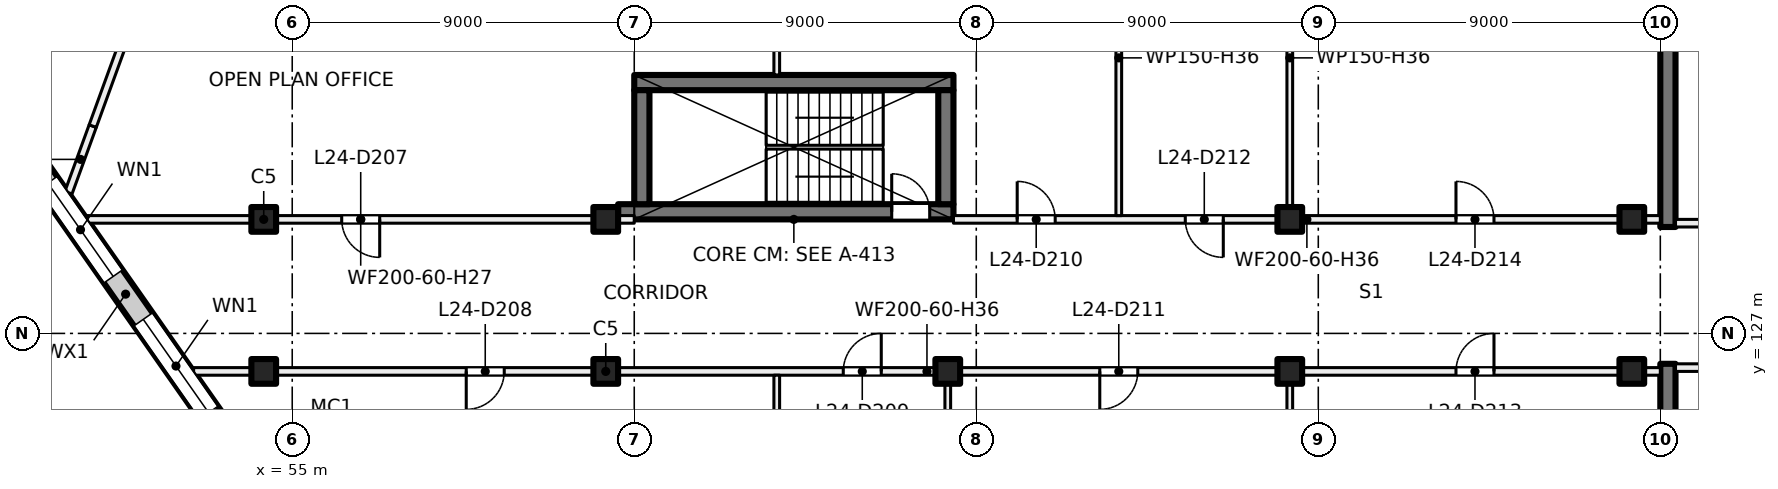
"""IFC4 building model, lengths in metres.
Left out: names, types, materials, properties, quantities, classifications, styles, units other than length and angle.
Written with IfcOpenShell. Run it as: python <this file> out.ifc"""

import sys

from ifc_helpers import new_model, si_unit, direction, frame, frame_2d, origin, origin_2d, place, context, subcontext, project, spatial, rectangle, extrude, element, fill, save


model = new_model("IFC4")
c1 = context("Model", 3, precision=1e-05, world=origin(), true_north=direction((0.0, 1.0)))
c2 = subcontext(c1, "Body", "Model", "MODEL_VIEW")
j1 = project(units=[si_unit("LENGTHUNIT", "METRE"), si_unit("PLANEANGLEUNIT", "RADIAN")], contexts=[c1])
p1 = place(None, origin())
s1 = spatial("IfcSite", under=j1, at=p1, CompositionType="ELEMENT")
p2 = place(p1, origin())
s2 = spatial("IfcBuilding", under=s1, at=p2, CompositionType="ELEMENT")
p3 = place(p2, frame((0.0, 0.0, 105.0)))
s3 = spatial("IfcBuildingStorey", under=s2, at=p3, CompositionType="ELEMENT", Elevation=105.0)
for number, where, z_axis, x_axis in (
    (1, (54.25, 130.0, 0.0), (0.0, 0.0, 1.0), (1.0, 0.0, 0.0)),
    (2, (63.25, 130.0, 0.0), (0.0, 0.0, 1.0), (1.0, 0.0, 0.0)),
    (3, (81.25, 130.0, 0.0), (0.0, 0.0, 1.0), (1.0, 0.0, 0.0)),
    (4, (90.25, 130.0, 0.0), (0.0, 0.0, 1.0), (1.0, 0.0, 0.0)),
    (5, (54.25, 126.0, 0.0), (0.0, 0.0, 1.0), (1.0, 0.0, 0.0)),
    (6, (63.25, 126.0, 0.0), (0.0, 0.0, 1.0), (1.0, 0.0, 0.0)),
    (7, (72.25, 126.0, 0.0), (0.0, 0.0, 1.0), (1.0, 0.0, 0.0)),
    (8, (81.25, 126.0, 0.0), (0.0, 0.0, 1.0), (1.0, 0.0, 0.0)),
    (9, (90.25, 126.0, 0.0), (0.0, 0.0, 1.0), (1.0, 0.0, 0.0)),
):
    element("IfcColumn", number, at=place(p3, frame(where, z_axis=z_axis, x_axis=x_axis)), inside=s3, PredefinedType="COLUMN", context=c2, shape_type="SweptSolid", body=[
        extrude(rectangle(XDim=0.65, YDim=0.65, at=origin_2d()), origin(), (0.0, 0.0, 1.0), 4.0),
    ])
for number, where, z_axis, x_axis in (
    (10, (91.2, 138.4, 0.0), (0.0, 0.0, 1.0), (0.0, -1.0, 0.0)),
    (11, (91.2, 126.2, 0.0), (0.0, 0.0, 1.0), (0.0, -1.0, 0.0)),
):
    element("IfcWall", number, at=place(p3, frame(where, z_axis=z_axis, x_axis=x_axis)), inside=s3, PredefinedType="SHEAR", context=c2, shape_type="SweptSolid", body=[
        extrude(rectangle(XDim=8.6, YDim=0.4, at=frame_2d((4.3, 0.0))), origin(), (0.0, 0.0, 1.0), 4.0),
    ])
p4 = place(p3, frame((63.575, 130.2, 0.0), z_axis=(0.0, 0.0, 1.0), x_axis=(1.0, 0.0, 0.0)))
e12 = element("IfcWall", 12, at=p4, inside=s3, PredefinedType="SHEAR", context=c2, shape_type="SweptSolid", body=[
    extrude(rectangle(XDim=8.825, YDim=0.4, at=frame_2d((4.413, 0.0))), origin(), (0.0, 0.0, 1.0), 4.0),
])
p5 = place(p4, frame((7.2, 0.0, 0.0)))
e13 = element("IfcOpeningElement", 13, at=p5, cuts=e12, PredefinedType="OPENING", context=c2, shape_type="SweptSolid", body=[
    extrude(rectangle(XDim=1.0, YDim=2.1, at=frame_2d((0.5, 1.05))), frame((0.0, 0.21, 0.0), z_axis=(0.0, -1.0, 0.0), x_axis=(1.0, 0.0, 0.0)), (0.0, 0.0, 1.0), 0.42),
])
p6 = place(p3, frame((64.0, 133.6, 0.0), z_axis=(0.0, 0.0, 1.0), x_axis=(1.0, 0.0, 0.0)))
e14 = element("IfcWall", 14, at=p6, inside=s3, PredefinedType="SHEAR", context=c2, shape_type="SweptSolid", body=[
    extrude(rectangle(XDim=8.4, YDim=0.4, at=frame_2d((4.2, 0.0))), origin(), (0.0, 0.0, 1.0), 4.0),
])
for number, where, z_axis, x_axis in (
    (15, (64.2, 130.4, 0.0), (0.0, 0.0, 1.0), (0.0, 1.0, 0.0)),
    (16, (72.2, 130.4, 0.0), (0.0, 0.0, 1.0), (0.0, 1.0, 0.0)),
):
    element("IfcWall", number, at=place(p3, frame(where, z_axis=z_axis, x_axis=x_axis)), inside=s3, PredefinedType="SHEAR", context=c2, shape_type="SweptSolid", body=[
        extrude(rectangle(XDim=3.0, YDim=0.4, at=frame_2d((1.5, 0.0))), origin(), (0.0, 0.0, 1.0), 4.0),
    ])
p7 = place(p3, frame((58.083, 117.369, 0.0), z_axis=(0.0, 0.0, 1.0), x_axis=(-0.573573095716, 0.819154383416, 0.0)))
e17 = element("IfcWall", 17, at=p7, inside=s3, PredefinedType="SOLIDWALL", context=c2, shape_type="SweptSolid", body=[
    extrude(rectangle(XDim=26.037, YDim=0.6, at=frame_2d((13.019, 0.0))), origin(), (0.0, 0.0, 1.0), 3.625),
])
p8 = place(p7, frame((1.05, 0.0, 0.0)))
e18 = element("IfcOpeningElement", 18, at=p8, cuts=e17, PredefinedType="OPENING", context=c2, shape_type="SweptSolid", body=[
    extrude(rectangle(XDim=1.8, YDim=2.4, at=frame_2d((0.9, 1.2))), frame((0.0, 0.31, 0.0), z_axis=(0.0, -1.0, 0.0), x_axis=(1.0, 0.0, 0.0)), (0.0, 0.0, 1.0), 0.62),
])
p9 = place(p7, frame((4.829, 0.0, 0.9)))
e19 = element("IfcOpeningElement", 19, at=p9, cuts=e17, PredefinedType="OPENING", context=c2, shape_type="SweptSolid", body=[
    extrude(rectangle(XDim=3.0, YDim=2.4, at=frame_2d((1.5, 1.2))), frame((0.0, 0.31, 0.0), z_axis=(0.0, -1.0, 0.0), x_axis=(1.0, 0.0, 0.0)), (0.0, 0.0, 1.0), 0.62),
])
p10 = place(p7, frame((9.209, 0.0, 0.9)))
e20 = element("IfcOpeningElement", 20, at=p10, cuts=e17, PredefinedType="OPENING", context=c2, shape_type="SweptSolid", body=[
    extrude(rectangle(XDim=3.0, YDim=2.4, at=frame_2d((1.5, 1.2))), frame((0.0, 0.31, 0.0), z_axis=(0.0, -1.0, 0.0), x_axis=(1.0, 0.0, 0.0)), (0.0, 0.0, 1.0), 0.62),
])
p11 = place(p7, frame((13.588, 0.0, 0.9)))
e21 = element("IfcOpeningElement", 21, at=p11, cuts=e17, PredefinedType="OPENING", context=c2, shape_type="SweptSolid", body=[
    extrude(rectangle(XDim=3.0, YDim=2.4, at=frame_2d((1.5, 1.2))), frame((0.0, 0.31, 0.0), z_axis=(0.0, -1.0, 0.0), x_axis=(1.0, 0.0, 0.0)), (0.0, 0.0, 1.0), 0.62),
])
p12 = place(p7, frame((17.968, 0.0, 0.9)))
e22 = element("IfcOpeningElement", 22, at=p12, cuts=e17, PredefinedType="OPENING", context=c2, shape_type="SweptSolid", body=[
    extrude(rectangle(XDim=3.0, YDim=2.4, at=frame_2d((1.5, 1.2))), frame((0.0, 0.31, 0.0), z_axis=(0.0, -1.0, 0.0), x_axis=(1.0, 0.0, 0.0)), (0.0, 0.0, 1.0), 0.62),
])
p13 = place(p7, frame((22.198, 0.0, 0.9)))
e23 = element("IfcOpeningElement", 23, at=p13, cuts=e17, PredefinedType="OPENING", context=c2, shape_type="SweptSolid", body=[
    extrude(rectangle(XDim=3.0, YDim=2.4, at=frame_2d((1.5, 1.2))), frame((0.0, 0.31, 0.0), z_axis=(0.0, -1.0, 0.0), x_axis=(1.0, 0.0, 0.0)), (0.0, 0.0, 1.0), 0.62),
])
p14 = place(p3, frame((36.923, 134.338, 0.0), z_axis=(0.0, 0.0, 1.0), x_axis=(0.573575266068, -0.819152863729, 0.0)))
e24 = element("IfcWall", 24, at=p14, inside=s3, PredefinedType="SOLIDWALL", context=c2, shape_type="SweptSolid", body=[
    extrude(rectangle(XDim=26.117, YDim=0.6, at=frame_2d((13.059, 0.0))), origin(), (0.0, 0.0, 1.0), 3.625),
])
p15 = place(p14, frame((0.84, 0.0, 0.9)))
e25 = element("IfcOpeningElement", 25, at=p15, cuts=e24, PredefinedType="OPENING", context=c2, shape_type="SweptSolid", body=[
    extrude(rectangle(XDim=3.0, YDim=2.4, at=frame_2d((1.5, 1.2))), frame((0.0, 0.31, 0.0), z_axis=(0.0, -1.0, 0.0), x_axis=(1.0, 0.0, 0.0)), (0.0, 0.0, 1.0), 0.62),
])
p16 = place(p14, frame((5.669, 0.0, 0.0)))
e26 = element("IfcOpeningElement", 26, at=p16, cuts=e24, PredefinedType="OPENING", context=c2, shape_type="SweptSolid", body=[
    extrude(rectangle(XDim=1.8, YDim=2.4, at=frame_2d((0.9, 1.2))), frame((0.0, 0.31, 0.0), z_axis=(0.0, -1.0, 0.0), x_axis=(1.0, 0.0, 0.0)), (0.0, 0.0, 1.0), 0.62),
])
p17 = place(p14, frame((9.449, 0.0, 0.9)))
e27 = element("IfcOpeningElement", 27, at=p17, cuts=e24, PredefinedType="OPENING", context=c2, shape_type="SweptSolid", body=[
    extrude(rectangle(XDim=3.0, YDim=2.4, at=frame_2d((1.5, 1.2))), frame((0.0, 0.31, 0.0), z_axis=(0.0, -1.0, 0.0), x_axis=(1.0, 0.0, 0.0)), (0.0, 0.0, 1.0), 0.62),
])
p18 = place(p14, frame((13.829, 0.0, 0.9)))
e28 = element("IfcOpeningElement", 28, at=p18, cuts=e24, PredefinedType="OPENING", context=c2, shape_type="SweptSolid", body=[
    extrude(rectangle(XDim=3.0, YDim=2.4, at=frame_2d((1.5, 1.2))), frame((0.0, 0.31, 0.0), z_axis=(0.0, -1.0, 0.0), x_axis=(1.0, 0.0, 0.0)), (0.0, 0.0, 1.0), 0.62),
])
p19 = place(p14, frame((18.208, 0.0, 0.9)))
e29 = element("IfcOpeningElement", 29, at=p19, cuts=e24, PredefinedType="OPENING", context=c2, shape_type="SweptSolid", body=[
    extrude(rectangle(XDim=3.0, YDim=2.4, at=frame_2d((1.5, 1.2))), frame((0.0, 0.31, 0.0), z_axis=(0.0, -1.0, 0.0), x_axis=(1.0, 0.0, 0.0)), (0.0, 0.0, 1.0), 0.62),
])
p20 = place(p14, frame((22.438, 0.0, 0.9)))
e30 = element("IfcOpeningElement", 30, at=p20, cuts=e24, PredefinedType="OPENING", context=c2, shape_type="SweptSolid", body=[
    extrude(rectangle(XDim=3.0, YDim=2.4, at=frame_2d((1.5, 1.2))), frame((0.0, 0.31, 0.0), z_axis=(0.0, -1.0, 0.0), x_axis=(1.0, 0.0, 0.0)), (0.0, 0.0, 1.0), 0.62),
])
p21 = place(p3, frame((95.2, 126.1, 0.0), z_axis=(0.0, 0.0, 1.0), x_axis=(-1.0, 0.0, 0.0)))
e31 = element("IfcWall", 31, at=p21, inside=s3, PredefinedType="PARTITIONING", context=c2, shape_type="SweptSolid", body=[
    extrude(rectangle(XDim=3.8, YDim=0.2, at=frame_2d((1.9, 0.0))), origin(), (0.0, 0.0, 1.0), 3.625),
])
p22 = place(p21, frame((0.3, 0.0, 0.0)))
e32 = element("IfcOpeningElement", 32, at=p22, cuts=e31, PredefinedType="OPENING", context=c2, shape_type="SweptSolid", body=[
    extrude(rectangle(XDim=1.2, YDim=2.1, at=frame_2d((0.6, 1.05))), frame((0.0, 0.11, 0.0), z_axis=(0.0, -1.0, 0.0), x_axis=(1.0, 0.0, 0.0)), (0.0, 0.0, 1.0), 0.22),
])
p23 = place(p3, frame((91.4, 129.9, 0.0), z_axis=(0.0, 0.0, 1.0), x_axis=(1.0, 0.0, 0.0)))
e33 = element("IfcWall", 33, at=p23, inside=s3, PredefinedType="PARTITIONING", context=c2, shape_type="SweptSolid", body=[
    extrude(rectangle(XDim=3.8, YDim=0.2, at=frame_2d((1.9, 0.0))), origin(), (0.0, 0.0, 1.0), 3.625),
])
p24 = place(p23, frame((2.3, 0.0, 0.0)))
e34 = element("IfcOpeningElement", 34, at=p24, cuts=e33, PredefinedType="OPENING", context=c2, shape_type="SweptSolid", body=[
    extrude(rectangle(XDim=1.2, YDim=2.1, at=frame_2d((0.6, 1.05))), frame((0.0, 0.11, 0.0), z_axis=(0.0, -1.0, 0.0), x_axis=(1.0, 0.0, 0.0)), (0.0, 0.0, 1.0), 0.22),
])
p25 = place(p3, frame((49.112, 130.703, 0.0), z_axis=(0.0, 0.0, 1.0), x_axis=(0.342110969058, 0.939659557952, 0.0)))
e35 = element("IfcWall", 35, at=p25, inside=s3, PredefinedType="PARTITIONING", context=c2, shape_type="SweptSolid", body=[
    extrude(rectangle(XDim=1.865, YDim=0.2, at=frame_2d((0.932, 0.0))), origin(), (0.0, 0.0, 1.0), 2.725),
])
p26 = place(p3, frame((49.604, 130.0, 0.0), z_axis=(0.0, 0.0, 1.0), x_axis=(1.0, 0.0, 0.0)))
e36 = element("IfcWall", 36, at=p26, inside=s3, PredefinedType="PARTITIONING", context=c2, shape_type="SweptSolid", body=[
    extrude(rectangle(XDim=14.396, YDim=0.2, at=frame_2d((7.198, 0.0))), origin(), (0.0, 0.0, 1.0), 2.725),
])
p27 = place(p26, frame((6.698, 0.0, 0.0)))
e37 = element("IfcOpeningElement", 37, at=p27, cuts=e36, PredefinedType="OPENING", context=c2, shape_type="SweptSolid", body=[
    extrude(rectangle(XDim=1.0, YDim=2.1, at=frame_2d((0.5, 1.05))), frame((0.0, 0.11, 0.0), z_axis=(0.0, -1.0, 0.0), x_axis=(1.0, 0.0, 0.0)), (0.0, 0.0, 1.0), 0.22),
])
p28 = place(p3, frame((49.75, 132.455, 0.0), z_axis=(0.0, 0.0, 1.0), x_axis=(0.342030876691, 0.939688714091, 0.0)))
e38 = element("IfcWall", 38, at=p28, inside=s3, PredefinedType="PARTITIONING", context=c2, shape_type="SweptSolid", body=[
    extrude(rectangle(XDim=4.631, YDim=0.2, at=frame_2d((2.315, 0.0))), origin(), (0.0, 0.0, 1.0), 2.725),
])
p29 = place(p3, frame((91.0, 126.0, 0.0), z_axis=(0.0, 0.0, 1.0), x_axis=(-1.0, 0.0, 0.0)))
e39 = element("IfcWall", 39, at=p29, inside=s3, PredefinedType="PARTITIONING", context=c2, shape_type="SweptSolid", body=[
    extrude(rectangle(XDim=38.595, YDim=0.2, at=frame_2d((19.297, 0.0))), origin(), (0.0, 0.0, 1.0), 3.625),
])
p30 = place(p29, frame((30.421, 0.0, 0.0)))
e40 = element("IfcOpeningElement", 40, at=p30, cuts=e39, PredefinedType="OPENING", context=c2, shape_type="SweptSolid", body=[
    extrude(rectangle(XDim=1.0, YDim=2.1, at=frame_2d((0.5, 1.05))), frame((0.0, 0.11, 0.0), z_axis=(0.0, -1.0, 0.0), x_axis=(1.0, 0.0, 0.0)), (0.0, 0.0, 1.0), 0.22),
])
p31 = place(p29, frame((20.5, 0.0, 0.0)))
e41 = element("IfcOpeningElement", 41, at=p31, cuts=e39, PredefinedType="OPENING", context=c2, shape_type="SweptSolid", body=[
    extrude(rectangle(XDim=1.0, YDim=2.1, at=frame_2d((0.5, 1.05))), frame((0.0, 0.11, 0.0), z_axis=(0.0, -1.0, 0.0), x_axis=(1.0, 0.0, 0.0)), (0.0, 0.0, 1.0), 0.22),
])
p32 = place(p29, frame((13.75, 0.0, 0.0)))
e42 = element("IfcOpeningElement", 42, at=p32, cuts=e39, PredefinedType="OPENING", context=c2, shape_type="SweptSolid", body=[
    extrude(rectangle(XDim=1.0, YDim=2.1, at=frame_2d((0.5, 1.05))), frame((0.0, 0.11, 0.0), z_axis=(0.0, -1.0, 0.0), x_axis=(1.0, 0.0, 0.0)), (0.0, 0.0, 1.0), 0.22),
])
p33 = place(p29, frame((4.377, 0.0, 0.0)))
e43 = element("IfcOpeningElement", 43, at=p33, cuts=e39, PredefinedType="OPENING", context=c2, shape_type="SweptSolid", body=[
    extrude(rectangle(XDim=1.0, YDim=2.1, at=frame_2d((0.5, 1.05))), frame((0.0, 0.11, 0.0), z_axis=(0.0, -1.0, 0.0), x_axis=(1.0, 0.0, 0.0)), (0.0, 0.0, 1.0), 0.22),
])
p34 = place(p3, frame((67.75, 117.6, 0.0), z_axis=(0.0, 0.0, 1.0), x_axis=(0.0, 1.0, 0.0)))
e44 = element("IfcWall", 44, at=p34, inside=s3, PredefinedType="PARTITIONING", context=c2, shape_type="SweptSolid", body=[
    extrude(rectangle(XDim=8.3, YDim=0.15, at=frame_2d((4.15, 0.0))), origin(), (0.0, 0.0, 1.0), 3.625),
])
p35 = place(p3, frame((67.75, 133.8, 0.0), z_axis=(0.0, 0.0, 1.0), x_axis=(0.0, 1.0, 0.0)))
e45 = element("IfcWall", 45, at=p35, inside=s3, PredefinedType="PARTITIONING", context=c2, shape_type="SweptSolid", body=[
    extrude(rectangle(XDim=4.6, YDim=0.15, at=frame_2d((2.3, 0.0))), origin(), (0.0, 0.0, 1.0), 3.625),
])
p36 = place(p3, frame((72.25, 117.6, 0.0), z_axis=(0.0, 0.0, 1.0), x_axis=(0.0, 1.0, 0.0)))
e46 = element("IfcWall", 46, at=p36, inside=s3, PredefinedType="PARTITIONING", context=c2, shape_type="SweptSolid", body=[
    extrude(rectangle(XDim=8.3, YDim=0.15, at=frame_2d((4.15, 0.0))), origin(), (0.0, 0.0, 1.0), 3.625),
])
p37 = place(p3, frame((72.4, 130.0, 0.0), z_axis=(0.0, 0.0, 1.0), x_axis=(1.0, 0.0, 0.0)))
e47 = element("IfcWall", 47, at=p37, inside=s3, PredefinedType="PARTITIONING", context=c2, shape_type="SweptSolid", body=[
    extrude(rectangle(XDim=18.6, YDim=0.2, at=frame_2d((9.3, 0.0))), origin(), (0.0, 0.0, 1.0), 3.625),
])
p38 = place(p37, frame((1.677, 0.0, 0.0)))
e48 = element("IfcOpeningElement", 48, at=p38, cuts=e47, PredefinedType="OPENING", context=c2, shape_type="SweptSolid", body=[
    extrude(rectangle(XDim=1.0, YDim=2.1, at=frame_2d((0.5, 1.05))), frame((0.0, 0.11, 0.0), z_axis=(0.0, -1.0, 0.0), x_axis=(1.0, 0.0, 0.0)), (0.0, 0.0, 1.0), 0.22),
])
p39 = place(p37, frame((6.1, 0.0, 0.0)))
e49 = element("IfcOpeningElement", 49, at=p39, cuts=e47, PredefinedType="OPENING", context=c2, shape_type="SweptSolid", body=[
    extrude(rectangle(XDim=1.0, YDim=2.1, at=frame_2d((0.5, 1.05))), frame((0.0, 0.11, 0.0), z_axis=(0.0, -1.0, 0.0), x_axis=(1.0, 0.0, 0.0)), (0.0, 0.0, 1.0), 0.22),
])
p40 = place(p37, frame((13.223, 0.0, 0.0)))
e50 = element("IfcOpeningElement", 50, at=p40, cuts=e47, PredefinedType="OPENING", context=c2, shape_type="SweptSolid", body=[
    extrude(rectangle(XDim=1.0, YDim=2.1, at=frame_2d((0.5, 1.05))), frame((0.0, 0.11, 0.0), z_axis=(0.0, -1.0, 0.0), x_axis=(1.0, 0.0, 0.0)), (0.0, 0.0, 1.0), 0.22),
])
for number, where, z_axis, x_axis in (
    (51, (76.75, 130.1, 0.0), (0.0, 0.0, 1.0), (0.0, 1.0, 0.0)),
    (52, (81.25, 117.6, 0.0), (0.0, 0.0, 1.0), (0.0, 1.0, 0.0)),
    (53, (81.25, 130.1, 0.0), (0.0, 0.0, 1.0), (0.0, 1.0, 0.0)),
):
    element("IfcWall", number, at=place(p3, frame(where, z_axis=z_axis, x_axis=x_axis)), inside=s3, PredefinedType="PARTITIONING", context=c2, shape_type="SweptSolid", body=[
        extrude(rectangle(XDim=8.3, YDim=0.15, at=frame_2d((4.15, 0.0))), origin(), (0.0, 0.0, 1.0), 3.625),
    ])
p41 = place(p10, origin())
e54 = element("IfcWindow", 54, at=p41, inside=s3, PartitioningType="SINGLE_PANEL", PredefinedType="WINDOW", context=c2, shape_type="SweptSolid", body=[
    extrude(rectangle(XDim=3.0, YDim=2.4, at=frame_2d((1.5, 1.2))), frame((0.0, 0.03, 0.0), z_axis=(0.0, -1.0, 0.0), x_axis=(1.0, 0.0, 0.0)), (0.0, 0.0, 1.0), 0.06),
])
fill(e20, e54)
p42 = place(p11, origin())
e55 = element("IfcWindow", 55, at=p42, inside=s3, PartitioningType="SINGLE_PANEL", PredefinedType="WINDOW", context=c2, shape_type="SweptSolid", body=[
    extrude(rectangle(XDim=3.0, YDim=2.4, at=frame_2d((1.5, 1.2))), frame((0.0, 0.03, 0.0), z_axis=(0.0, -1.0, 0.0), x_axis=(1.0, 0.0, 0.0)), (0.0, 0.0, 1.0), 0.06),
])
fill(e21, e55)
p43 = place(p5, origin())
e56 = element("IfcDoor", 56, at=p43, inside=s3, OperationType="SINGLE_SWING_LEFT", PredefinedType="DOOR", context=c2, shape_type="SweptSolid", body=[
    extrude(rectangle(XDim=1.0, YDim=2.1, at=frame_2d((0.5, 1.05))), frame((0.0, 0.025, 0.0), z_axis=(0.0, -1.0, 0.0), x_axis=(1.0, 0.0, 0.0)), (0.0, 0.0, 1.0), 0.05),
])
fill(e13, e56)
p44 = place(p27, origin())
e57 = element("IfcDoor", 57, at=p44, inside=s3, OperationType="SINGLE_SWING_RIGHT", PredefinedType="DOOR", context=c2, shape_type="SweptSolid", body=[
    extrude(rectangle(XDim=1.0, YDim=2.1, at=frame_2d((0.5, 1.05))), frame((0.0, 0.025, 0.0), z_axis=(0.0, -1.0, 0.0), x_axis=(1.0, 0.0, 0.0)), (0.0, 0.0, 1.0), 0.05),
])
fill(e37, e57)
p45 = place(p30, origin())
e58 = element("IfcDoor", 58, at=p45, inside=s3, OperationType="SINGLE_SWING_RIGHT", PredefinedType="DOOR", context=c2, shape_type="SweptSolid", body=[
    extrude(rectangle(XDim=1.0, YDim=2.1, at=frame_2d((0.5, 1.05))), frame((0.0, 0.025, 0.0), z_axis=(0.0, -1.0, 0.0), x_axis=(1.0, 0.0, 0.0)), (0.0, 0.0, 1.0), 0.05),
])
fill(e40, e58)
p46 = place(p31, origin())
e59 = element("IfcDoor", 59, at=p46, inside=s3, OperationType="SINGLE_SWING_LEFT", PredefinedType="DOOR", context=c2, shape_type="SweptSolid", body=[
    extrude(rectangle(XDim=1.0, YDim=2.1, at=frame_2d((0.5, 1.05))), frame((0.0, 0.025, 0.0), z_axis=(0.0, -1.0, 0.0), x_axis=(1.0, 0.0, 0.0)), (0.0, 0.0, 1.0), 0.05),
])
fill(e41, e59)
p47 = place(p38, origin())
e60 = element("IfcDoor", 60, at=p47, inside=s3, OperationType="SINGLE_SWING_LEFT", PredefinedType="DOOR", context=c2, shape_type="SweptSolid", body=[
    extrude(rectangle(XDim=1.0, YDim=2.1, at=frame_2d((0.5, 1.05))), frame((0.0, 0.025, 0.0), z_axis=(0.0, -1.0, 0.0), x_axis=(1.0, 0.0, 0.0)), (0.0, 0.0, 1.0), 0.05),
])
fill(e48, e60)
p48 = place(p32, origin())
e61 = element("IfcDoor", 61, at=p48, inside=s3, OperationType="SINGLE_SWING_RIGHT", PredefinedType="DOOR", context=c2, shape_type="SweptSolid", body=[
    extrude(rectangle(XDim=1.0, YDim=2.1, at=frame_2d((0.5, 1.05))), frame((0.0, 0.025, 0.0), z_axis=(0.0, -1.0, 0.0), x_axis=(1.0, 0.0, 0.0)), (0.0, 0.0, 1.0), 0.05),
])
fill(e42, e61)
p49 = place(p39, origin())
e62 = element("IfcDoor", 62, at=p49, inside=s3, OperationType="SINGLE_SWING_RIGHT", PredefinedType="DOOR", context=c2, shape_type="SweptSolid", body=[
    extrude(rectangle(XDim=1.0, YDim=2.1, at=frame_2d((0.5, 1.05))), frame((0.0, 0.025, 0.0), z_axis=(0.0, -1.0, 0.0), x_axis=(1.0, 0.0, 0.0)), (0.0, 0.0, 1.0), 0.05),
])
fill(e49, e62)
p50 = place(p33, origin())
e63 = element("IfcDoor", 63, at=p50, inside=s3, OperationType="SINGLE_SWING_LEFT", PredefinedType="DOOR", context=c2, shape_type="SweptSolid", body=[
    extrude(rectangle(XDim=1.0, YDim=2.1, at=frame_2d((0.5, 1.05))), frame((0.0, 0.025, 0.0), z_axis=(0.0, -1.0, 0.0), x_axis=(1.0, 0.0, 0.0)), (0.0, 0.0, 1.0), 0.05),
])
fill(e43, e63)
p51 = place(p40, origin())
e64 = element("IfcDoor", 64, at=p51, inside=s3, OperationType="SINGLE_SWING_LEFT", PredefinedType="DOOR", context=c2, shape_type="SweptSolid", body=[
    extrude(rectangle(XDim=1.0, YDim=2.1, at=frame_2d((0.5, 1.05))), frame((0.0, 0.025, 0.0), z_axis=(0.0, -1.0, 0.0), x_axis=(1.0, 0.0, 0.0)), (0.0, 0.0, 1.0), 0.05),
])
fill(e50, e64)
save(model, sys.argv[1])
